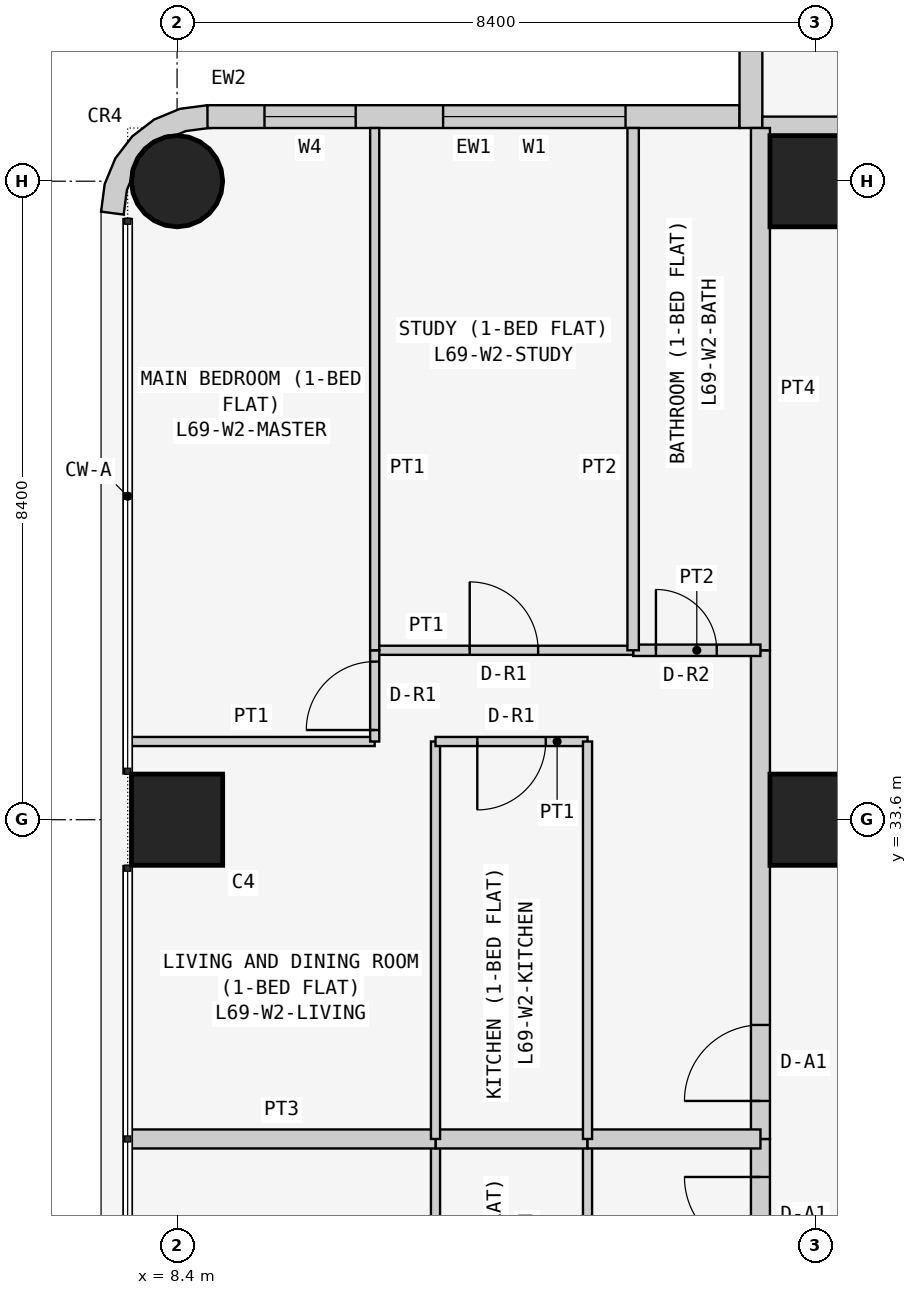
"""IFC4 building model, lengths in metres.
Left out: names, types, materials, properties, quantities, classifications, styles, units other than length and angle.
Written with IfcOpenShell. Run it as: python <this file> out.ifc"""

import sys

from ifc_helpers import new_model, si_unit, direction, frame, frame_2d, origin, origin_2d, place, context, subcontext, project, spatial, polyline, rectangle, circle, outline, extrude, element, fill, save


model = new_model("IFC4")
c1 = context("Model", 3, precision=1e-05, world=origin(), true_north=direction((0.0, 1.0)))
c2 = subcontext(c1, "Body", "Model", "MODEL_VIEW")
j1 = project(units=[si_unit("LENGTHUNIT", "METRE"), si_unit("PLANEANGLEUNIT", "RADIAN")], contexts=[c1])
p1 = place(None, origin())
s1 = spatial("IfcSite", under=j1, at=p1, CompositionType="ELEMENT")
p2 = place(p1, origin())
s2 = spatial("IfcBuilding", under=s1, at=p2, CompositionType="ELEMENT")
p3 = place(p2, frame((0.0, 0.0, 264.9)))
s3 = spatial("IfcBuildingStorey", under=s2, at=p3, CompositionType="ELEMENT", Elevation=264.9)
p4 = place(p3, frame((8.4, 33.6, 0.0), z_axis=(0.0, 0.0, 1.0), x_axis=(1.0, 0.0, 0.0)))
e1 = element("IfcColumn", 1, at=p4, inside=s3, PredefinedType="COLUMN", context=c2, shape_type="SweptSolid", body=[
    extrude(rectangle(XDim=1.2, YDim=1.2, at=origin_2d()), origin(), (0.0, 0.0, 1.0), 3.6),
])
p5 = place(p3, frame((8.4, 42.0, 0.0), z_axis=(0.0, 0.0, 1.0), x_axis=(1.0, 0.0, 0.0)))
e2 = element("IfcColumn", 2, at=p5, inside=s3, PredefinedType="COLUMN", context=c2, shape_type="SweptSolid", body=[
    extrude(circle(Radius=0.6, at=origin_2d()), origin(), (0.0, 0.0, 1.0), 3.6),
])
for number, where, z_axis, x_axis in (
    (3, (16.8, 33.6, 0.0), (0.0, 0.0, 1.0), (1.0, 0.0, 0.0)),
    (4, (16.8, 42.0, 0.0), (0.0, 0.0, 1.0), (1.0, 0.0, 0.0)),
):
    element("IfcColumn", number, at=place(p3, frame(where, z_axis=z_axis, x_axis=x_axis)), inside=s3, PredefinedType="COLUMN", context=c2, shape_type="SweptSolid", body=[
        extrude(rectangle(XDim=1.2, YDim=1.2, at=origin_2d()), origin(), (0.0, 0.0, 1.0), 3.6),
    ])
p6 = place(p3, frame((15.8, 42.85, 0.0), z_axis=(0.0, 0.0, 1.0), x_axis=(-1.0, 0.0, 0.0)))
e5 = element("IfcWall", 5, at=p6, inside=s3, PredefinedType="SOLIDWALL", context=c2, shape_type="SweptSolid", body=[
    extrude(rectangle(XDim=7.0, YDim=0.3, at=frame_2d((3.5, 0.0))), origin(), (0.0, 0.0, 1.0), 3.45),
])
p7 = place(p6, frame((1.5, 0.0, 0.9)))
e6 = element("IfcOpeningElement", 6, at=p7, cuts=e5, PredefinedType="OPENING", context=c2, shape_type="SweptSolid", body=[
    extrude(rectangle(XDim=2.4, YDim=1.5, at=frame_2d((1.2, 0.75))), frame((0.0, 0.16, 0.0), z_axis=(0.0, -1.0, 0.0), x_axis=(1.0, 0.0, 0.0)), (0.0, 0.0, 1.0), 0.32),
])
p8 = place(p6, frame((5.05, 0.0, 0.9)))
e7 = element("IfcOpeningElement", 7, at=p8, cuts=e5, PredefinedType="OPENING", context=c2, shape_type="SweptSolid", body=[
    extrude(rectangle(XDim=1.2, YDim=1.5, at=frame_2d((0.6, 0.75))), frame((0.0, 0.16, 0.0), z_axis=(0.0, -1.0, 0.0), x_axis=(1.0, 0.0, 0.0)), (0.0, 0.0, 1.0), 0.32),
])
p9 = place(p3, frame((15.95, 50.0, 0.0), z_axis=(0.0, 0.0, 1.0), x_axis=(0.0, -1.0, 0.0)))
e8 = element("IfcWall", 8, at=p9, inside=s3, PredefinedType="SOLIDWALL", context=c2, shape_type="SweptSolid", body=[
    extrude(rectangle(XDim=7.3, YDim=0.3, at=frame_2d((3.65, 0.0))), origin(), (0.0, 0.0, 1.0), 3.45),
])
p10 = place(p9, frame((3.1, 0.0, 0.9)))
e9 = element("IfcOpeningElement", 9, at=p10, cuts=e8, PredefinedType="OPENING", context=c2, shape_type="SweptSolid", body=[
    extrude(rectangle(XDim=2.4, YDim=1.5, at=frame_2d((1.2, 0.75))), frame((0.0, 0.16, 0.0), z_axis=(0.0, -1.0, 0.0), x_axis=(1.0, 0.0, 0.0)), (0.0, 0.0, 1.0), 0.32),
])
p11 = place(p9, frame((0.75, 0.0, 0.9)))
e10 = element("IfcOpeningElement", 10, at=p11, cuts=e8, PredefinedType="OPENING", context=c2, shape_type="SweptSolid", body=[
    extrude(rectangle(XDim=1.2, YDim=1.5, at=frame_2d((0.6, 0.75))), frame((0.0, 0.16, 0.0), z_axis=(0.0, -1.0, 0.0), x_axis=(1.0, 0.0, 0.0)), (0.0, 0.0, 1.0), 0.32),
])
p12 = place(p3, frame((8.762, 42.576, 0.0), z_axis=(0.0, 0.0, 1.0), x_axis=(-0.707106781187, 0.707106781187, 0.0)))
e11 = element("IfcWall", 11, at=p12, inside=s3, PredefinedType="SOLIDWALL", context=c2, shape_type="SweptSolid", body=[
    extrude(outline(polyline([(0.233, 0.114), (0.047, -0.129), (0.033, -0.143), (0.273, -0.327), (0.495, -0.037), (0.635, 0.3), (0.683, 0.663), (0.635, 1.025), (0.495, 1.363), (0.273, 1.653), (0.033, 1.469), (0.047, 1.455), (0.233, 1.212), (0.292, 1.069), (0.358, 1.003), (0.449, 0.783), (0.449, 0.543), (0.358, 0.322), (0.292, 0.257), (0.233, 0.114)])), origin(), (0.0, 0.0, 1.0), 3.45),
])
p13 = place(p3, frame((16.1, 42.725, 0.0), z_axis=(0.0, 0.0, 1.0), x_axis=(1.0, 0.0, 0.0)))
e12 = element("IfcWall", 12, at=p13, inside=s3, PredefinedType="PARTITIONING", context=c2, shape_type="SweptSolid", body=[
    extrude(rectangle(XDim=6.871, YDim=0.25, at=frame_2d((3.436, 0.0))), origin(), (0.0, 0.0, 1.0), 3.45),
])
p14 = place(p3, frame((16.075, 22.971, 0.0), z_axis=(0.0, 0.0, 1.0), x_axis=(0.0, 1.0, 0.0)))
e13 = element("IfcWall", 13, at=p14, inside=s3, PredefinedType="PARTITIONING", context=c2, shape_type="SweptSolid", body=[
    extrude(rectangle(XDim=6.429, YDim=0.25, at=frame_2d((3.214, 0.0))), origin(), (0.0, 0.0, 1.0), 3.45),
])
p15 = place(p14, frame((4.929, 0.0, 0.0)))
e14 = element("IfcOpeningElement", 14, at=p15, cuts=e13, PredefinedType="OPENING", context=c2, shape_type="SweptSolid", body=[
    extrude(rectangle(XDim=1.0, YDim=2.1, at=frame_2d((0.5, 1.05))), frame((0.0, 0.135, 0.0), z_axis=(0.0, -1.0, 0.0), x_axis=(1.0, 0.0, 0.0)), (0.0, 0.0, 1.0), 0.27),
])
p16 = place(p3, frame((16.075, 29.4, 0.0), z_axis=(0.0, 0.0, 1.0), x_axis=(0.0, 1.0, 0.0)))
e15 = element("IfcWall", 15, at=p16, inside=s3, PredefinedType="PARTITIONING", context=c2, shape_type="SweptSolid", body=[
    extrude(rectangle(XDim=6.429, YDim=0.25, at=frame_2d((3.215, 0.0))), origin(), (0.0, 0.0, 1.0), 3.45),
])
p17 = place(p16, frame((0.5, 0.0, 0.0)))
e16 = element("IfcOpeningElement", 16, at=p17, cuts=e15, PredefinedType="OPENING", context=c2, shape_type="SweptSolid", body=[
    extrude(rectangle(XDim=1.0, YDim=2.1, at=frame_2d((0.5, 1.05))), frame((0.0, 0.135, 0.0), z_axis=(0.0, -1.0, 0.0), x_axis=(1.0, 0.0, 0.0)), (0.0, 0.0, 1.0), 0.27),
])
p18 = place(p3, frame((16.075, 35.829, 0.0), z_axis=(0.0, 0.0, 1.0), x_axis=(0.0, 1.0, 0.0)))
e17 = element("IfcWall", 17, at=p18, inside=s3, PredefinedType="PARTITIONING", context=c2, shape_type="SweptSolid", body=[
    extrude(rectangle(XDim=6.871, YDim=0.25, at=frame_2d((3.436, 0.0))), origin(), (0.0, 0.0, 1.0), 3.45),
])
for number, where, z_axis, x_axis in (
    (18, (11.8, 29.4, 0.0), (0.0, 0.0, 1.0), (0.0, -1.0, 0.0)),
    (19, (13.8, 24.171, 0.0), (0.0, 0.0, 1.0), (0.0, 1.0, 0.0)),
):
    element("IfcWall", number, at=place(p3, frame(where, z_axis=z_axis, x_axis=x_axis)), inside=s3, PredefinedType="PARTITIONING", context=c2, shape_type="SweptSolid", body=[
        extrude(rectangle(XDim=5.229, YDim=0.12, at=frame_2d((2.615, 0.0))), origin(), (0.0, 0.0, 1.0), 3.45),
    ])
p19 = place(p3, frame((13.8, 29.4, 0.0), z_axis=(0.0, 0.0, 1.0), x_axis=(-1.0, 0.0, 0.0)))
e20 = element("IfcWall", 20, at=p19, inside=s3, PredefinedType="PARTITIONING", context=c2, shape_type="SweptSolid", body=[
    extrude(rectangle(XDim=2.0, YDim=0.25, at=frame_2d((1.0, 0.0))), origin(), (0.0, 0.0, 1.0), 3.45),
])
p20 = place(p3, frame((7.75, 29.4, 0.0), z_axis=(0.0, 0.0, 1.0), x_axis=(1.0, 0.0, 0.0)))
e21 = element("IfcWall", 21, at=p20, inside=s3, PredefinedType="PARTITIONING", context=c2, shape_type="SweptSolid", body=[
    extrude(rectangle(XDim=4.05, YDim=0.25, at=frame_2d((2.025, 0.0))), origin(), (0.0, 0.0, 1.0), 3.45),
])
p21 = place(p3, frame((13.8, 29.4, 0.0), z_axis=(0.0, 0.0, 1.0), x_axis=(1.0, 0.0, 0.0)))
e22 = element("IfcWall", 22, at=p21, inside=s3, PredefinedType="PARTITIONING", context=c2, shape_type="SweptSolid", body=[
    extrude(rectangle(XDim=2.275, YDim=0.25, at=frame_2d((1.137, 0.0))), origin(), (0.0, 0.0, 1.0), 3.45),
])
p22 = place(p3, frame((11.8, 29.4, 0.0), z_axis=(0.0, 0.0, 1.0), x_axis=(0.0, 1.0, 0.0)))
e23 = element("IfcWall", 23, at=p22, inside=s3, PredefinedType="PARTITIONING", context=c2, shape_type="SweptSolid", body=[
    extrude(rectangle(XDim=5.229, YDim=0.12, at=frame_2d((2.615, 0.0))), origin(), (0.0, 0.0, 1.0), 3.45),
])
p23 = place(p3, frame((11.8, 34.629, 0.0), z_axis=(0.0, 0.0, 1.0), x_axis=(1.0, 0.0, 0.0)))
e24 = element("IfcWall", 24, at=p23, inside=s3, PredefinedType="PARTITIONING", context=c2, shape_type="SweptSolid", body=[
    extrude(rectangle(XDim=2.0, YDim=0.12, at=frame_2d((1.0, 0.0))), origin(), (0.0, 0.0, 1.0), 3.45),
])
p24 = place(p23, frame((0.55, 0.0, 0.0)))
e25 = element("IfcOpeningElement", 25, at=p24, cuts=e24, PredefinedType="OPENING", context=c2, shape_type="SweptSolid", body=[
    extrude(rectangle(XDim=0.9, YDim=2.1, at=frame_2d((0.45, 1.05))), frame((0.0, 0.07, 0.0), z_axis=(0.0, -1.0, 0.0), x_axis=(1.0, 0.0, 0.0)), (0.0, 0.0, 1.0), 0.14),
])
p25 = place(p3, frame((13.8, 34.629, 0.0), z_axis=(0.0, 0.0, 1.0), x_axis=(0.0, -1.0, 0.0)))
e26 = element("IfcWall", 26, at=p25, inside=s3, PredefinedType="PARTITIONING", context=c2, shape_type="SweptSolid", body=[
    extrude(rectangle(XDim=5.229, YDim=0.12, at=frame_2d((2.615, 0.0))), origin(), (0.0, 0.0, 1.0), 3.45),
])
p26 = place(p3, frame((14.4, 35.829, 0.0), z_axis=(0.0, 0.0, 1.0), x_axis=(1.0, 0.0, 0.0)))
e27 = element("IfcWall", 27, at=p26, inside=s3, PredefinedType="PARTITIONING", context=c2, shape_type="SweptSolid", body=[
    extrude(rectangle(XDim=1.675, YDim=0.15, at=frame_2d((0.837, 0.0))), origin(), (0.0, 0.0, 1.0), 3.45),
])
p27 = place(p26, frame((0.3, 0.0, 0.0)))
e28 = element("IfcOpeningElement", 28, at=p27, cuts=e27, PredefinedType="OPENING", context=c2, shape_type="SweptSolid", body=[
    extrude(rectangle(XDim=0.8, YDim=2.1, at=frame_2d((0.4, 1.05))), frame((0.0, 0.085, 0.0), z_axis=(0.0, -1.0, 0.0), x_axis=(1.0, 0.0, 0.0)), (0.0, 0.0, 1.0), 0.17),
])
p28 = place(p3, frame((11.0, 35.829, 0.0), z_axis=(0.0, 0.0, 1.0), x_axis=(1.0, 0.0, 0.0)))
e29 = element("IfcWall", 29, at=p28, inside=s3, PredefinedType="PARTITIONING", context=c2, shape_type="SweptSolid", body=[
    extrude(rectangle(XDim=3.4, YDim=0.12, at=frame_2d((1.7, 0.0))), origin(), (0.0, 0.0, 1.0), 3.45),
])
p29 = place(p28, frame((1.25, 0.0, 0.0)))
e30 = element("IfcOpeningElement", 30, at=p29, cuts=e29, PredefinedType="OPENING", context=c2, shape_type="SweptSolid", body=[
    extrude(rectangle(XDim=0.9, YDim=2.1, at=frame_2d((0.45, 1.05))), frame((0.0, 0.07, 0.0), z_axis=(0.0, -1.0, 0.0), x_axis=(1.0, 0.0, 0.0)), (0.0, 0.0, 1.0), 0.14),
])
p30 = place(p3, frame((7.75, 34.629, 0.0), z_axis=(0.0, 0.0, 1.0), x_axis=(1.0, 0.0, 0.0)))
e31 = element("IfcWall", 31, at=p30, inside=s3, PredefinedType="PARTITIONING", context=c2, shape_type="SweptSolid", body=[
    extrude(rectangle(XDim=3.25, YDim=0.12, at=frame_2d((1.625, 0.0))), origin(), (0.0, 0.0, 1.0), 3.45),
])
p31 = place(p3, frame((11.0, 34.629, 0.0), z_axis=(0.0, 0.0, 1.0), x_axis=(0.0, 1.0, 0.0)))
e32 = element("IfcWall", 32, at=p31, inside=s3, PredefinedType="PARTITIONING", context=c2, shape_type="SweptSolid", body=[
    extrude(rectangle(XDim=1.2, YDim=0.12, at=frame_2d((0.6, 0.0))), origin(), (0.0, 0.0, 1.0), 3.45),
])
p32 = place(p31, frame((0.151, 0.0, 0.0)))
e33 = element("IfcOpeningElement", 33, at=p32, cuts=e32, PredefinedType="OPENING", context=c2, shape_type="SweptSolid", body=[
    extrude(rectangle(XDim=0.9, YDim=2.1, at=frame_2d((0.45, 1.05))), frame((0.0, 0.07, 0.0), z_axis=(0.0, -1.0, 0.0), x_axis=(1.0, 0.0, 0.0)), (0.0, 0.0, 1.0), 0.14),
])
p33 = place(p3, frame((14.4, 35.829, 0.0), z_axis=(0.0, 0.0, 1.0), x_axis=(0.0, 1.0, 0.0)))
e34 = element("IfcWall", 34, at=p33, inside=s3, PredefinedType="PARTITIONING", context=c2, shape_type="SweptSolid", body=[
    extrude(rectangle(XDim=6.871, YDim=0.15, at=frame_2d((3.436, 0.0))), origin(), (0.0, 0.0, 1.0), 3.45),
])
p34 = place(p3, frame((11.0, 35.829, 0.0), z_axis=(0.0, 0.0, 1.0), x_axis=(0.0, 1.0, 0.0)))
e35 = element("IfcWall", 35, at=p34, inside=s3, PredefinedType="PARTITIONING", context=c2, shape_type="SweptSolid", body=[
    extrude(rectangle(XDim=6.871, YDim=0.12, at=frame_2d((3.436, 0.0))), origin(), (0.0, 0.0, 1.0), 3.45),
])
p35 = place(p7, origin())
e36 = element("IfcWindow", 36, at=p35, inside=s3, PartitioningType="SINGLE_PANEL", PredefinedType="WINDOW", context=c2, shape_type="SweptSolid", body=[
    extrude(rectangle(XDim=2.4, YDim=1.5, at=frame_2d((1.2, 0.75))), frame((0.0, 0.03, 0.0), z_axis=(0.0, -1.0, 0.0), x_axis=(1.0, 0.0, 0.0)), (0.0, 0.0, 1.0), 0.06),
])
fill(e6, e36)
p36 = place(p8, origin())
e37 = element("IfcWindow", 37, at=p36, inside=s3, PartitioningType="SINGLE_PANEL", PredefinedType="WINDOW", context=c2, shape_type="SweptSolid", body=[
    extrude(rectangle(XDim=1.2, YDim=1.5, at=frame_2d((0.6, 0.75))), frame((0.0, 0.03, 0.0), z_axis=(0.0, -1.0, 0.0), x_axis=(1.0, 0.0, 0.0)), (0.0, 0.0, 1.0), 0.06),
])
fill(e7, e37)
p37 = place(p15, origin())
e38 = element("IfcDoor", 38, at=p37, inside=s3, OperationType="SINGLE_SWING_RIGHT", PredefinedType="DOOR", context=c2, shape_type="SweptSolid", body=[
    extrude(rectangle(XDim=1.0, YDim=2.1, at=frame_2d((0.5, 1.05))), frame((0.0, 0.025, 0.0), z_axis=(0.0, -1.0, 0.0), x_axis=(1.0, 0.0, 0.0)), (0.0, 0.0, 1.0), 0.05),
])
fill(e14, e38)
p38 = place(p17, origin())
e39 = element("IfcDoor", 39, at=p38, inside=s3, OperationType="SINGLE_SWING_LEFT", PredefinedType="DOOR", context=c2, shape_type="SweptSolid", body=[
    extrude(rectangle(XDim=1.0, YDim=2.1, at=frame_2d((0.5, 1.05))), frame((0.0, 0.025, 0.0), z_axis=(0.0, -1.0, 0.0), x_axis=(1.0, 0.0, 0.0)), (0.0, 0.0, 1.0), 0.05),
])
fill(e16, e39)
p39 = place(p24, frame((0.9, 0.0, 0.0), z_axis=(0.0, 0.0, 1.0), x_axis=(-1.0, 0.0, 0.0)))
e40 = element("IfcDoor", 40, at=p39, inside=s3, OperationType="SINGLE_SWING_RIGHT", PredefinedType="DOOR", context=c2, shape_type="SweptSolid", body=[
    extrude(rectangle(XDim=0.9, YDim=2.1, at=frame_2d((0.45, 1.05))), frame((0.0, 0.025, 0.0), z_axis=(0.0, -1.0, 0.0), x_axis=(1.0, 0.0, 0.0)), (0.0, 0.0, 1.0), 0.05),
])
fill(e25, e40)
p40 = place(p27, origin())
e41 = element("IfcDoor", 41, at=p40, inside=s3, OperationType="SINGLE_SWING_LEFT", PredefinedType="DOOR", context=c2, shape_type="SweptSolid", body=[
    extrude(rectangle(XDim=0.8, YDim=2.1, at=frame_2d((0.4, 1.05))), frame((0.0, 0.025, 0.0), z_axis=(0.0, -1.0, 0.0), x_axis=(1.0, 0.0, 0.0)), (0.0, 0.0, 1.0), 0.05),
])
fill(e28, e41)
p41 = place(p29, origin())
e42 = element("IfcDoor", 42, at=p41, inside=s3, OperationType="SINGLE_SWING_LEFT", PredefinedType="DOOR", context=c2, shape_type="SweptSolid", body=[
    extrude(rectangle(XDim=0.9, YDim=2.1, at=frame_2d((0.45, 1.05))), frame((0.0, 0.025, 0.0), z_axis=(0.0, -1.0, 0.0), x_axis=(1.0, 0.0, 0.0)), (0.0, 0.0, 1.0), 0.05),
])
fill(e30, e42)
p42 = place(p32, origin())
e43 = element("IfcDoor", 43, at=p42, inside=s3, OperationType="SINGLE_SWING_LEFT", PredefinedType="DOOR", context=c2, shape_type="SweptSolid", body=[
    extrude(rectangle(XDim=0.9, YDim=2.1, at=frame_2d((0.45, 1.05))), frame((0.0, 0.025, 0.0), z_axis=(0.0, -1.0, 0.0), x_axis=(1.0, 0.0, 0.0)), (0.0, 0.0, 1.0), 0.05),
])
fill(e33, e43)
save(model, sys.argv[1])
